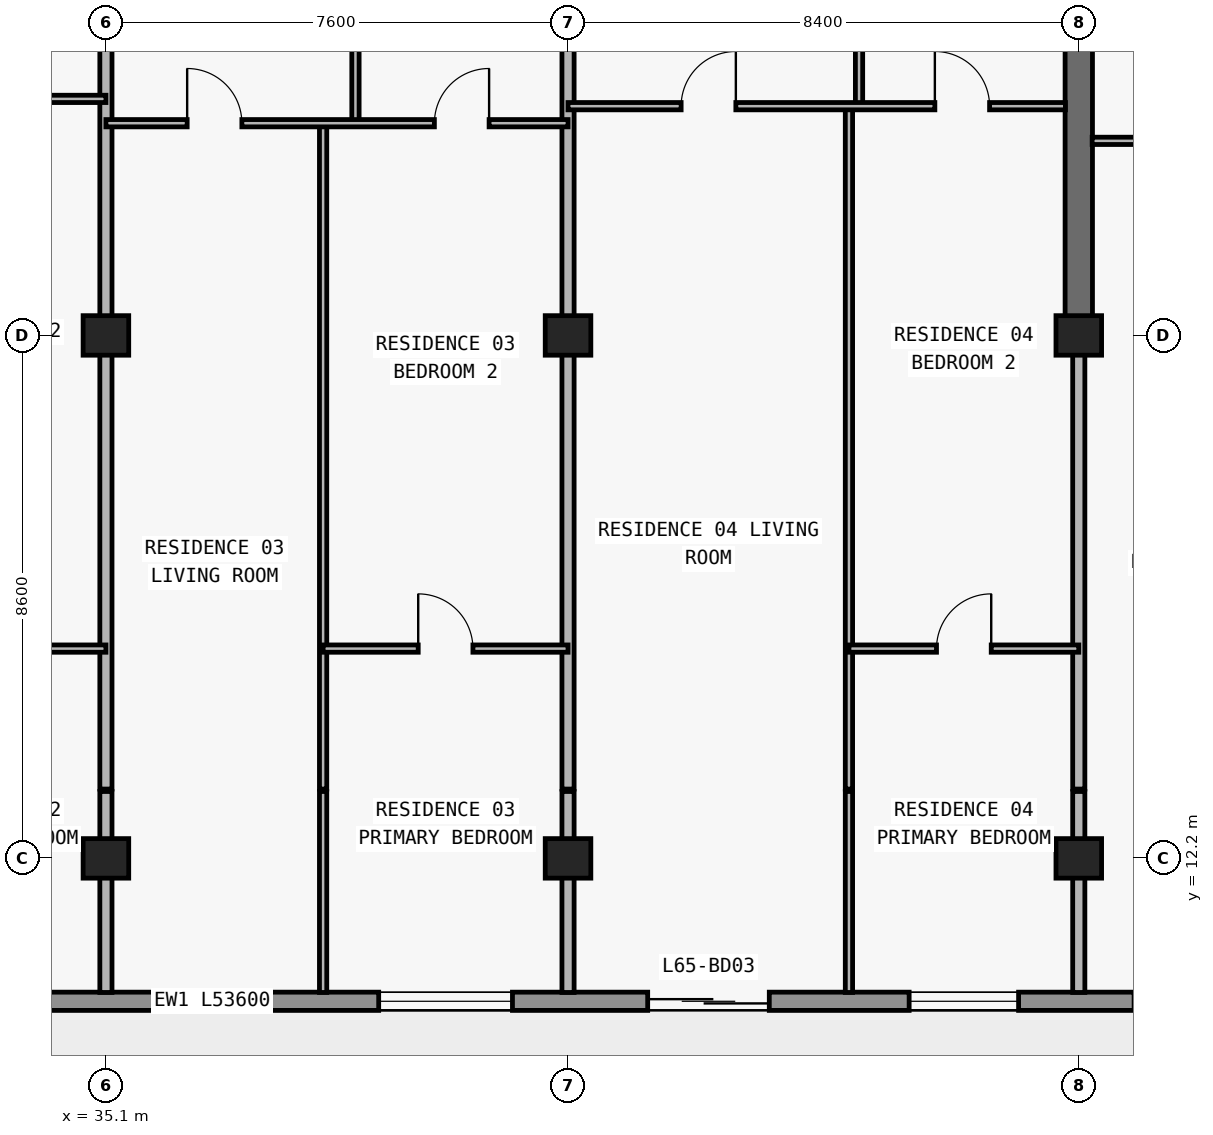
"""IFC4 building model, lengths in metres.
Left out: names, types, materials, properties, quantities, classifications, styles, units other than length and angle.
Written with IfcOpenShell. Run it as: python <this file> out.ifc"""

import sys

from ifc_helpers import new_model, si_unit, direction, frame, frame_2d, origin, origin_2d, place, context, subcontext, project, spatial, rectangle, extrude, element, fill, save


model = new_model("IFC4")
c1 = context("Model", 3, precision=1e-05, world=origin(), true_north=direction((0.0, 1.0)))
c2 = subcontext(c1, "Body", "Model", "MODEL_VIEW")
j1 = project(units=[si_unit("LENGTHUNIT", "METRE"), si_unit("PLANEANGLEUNIT", "RADIAN")], contexts=[c1])
p1 = place(None, origin())
s1 = spatial("IfcSite", under=j1, at=p1, CompositionType="ELEMENT")
p2 = place(p1, origin())
s2 = spatial("IfcBuilding", under=s1, at=p2, CompositionType="ELEMENT")
p3 = place(p2, frame((0.0, 0.0, 233.1)))
s3 = spatial("IfcBuildingStorey", under=s2, at=p3, CompositionType="ELEMENT", Elevation=233.1)
for number, where, z_axis, x_axis in (
    (1, (35.1, 12.2, 0.0), (0.0, 0.0, 1.0), (1.0, 0.0, 0.0)),
    (2, (42.7, 12.2, 0.0), (0.0, 0.0, 1.0), (1.0, 0.0, 0.0)),
    (3, (51.1, 12.2, 0.0), (0.0, 0.0, 1.0), (1.0, 0.0, 0.0)),
    (4, (35.1, 20.8, 0.0), (0.0, 0.0, 1.0), (1.0, 0.0, 0.0)),
    (5, (42.7, 20.8, 0.0), (0.0, 0.0, 1.0), (1.0, 0.0, 0.0)),
    (6, (51.1, 20.8, 0.0), (0.0, 0.0, 1.0), (1.0, 0.0, 0.0)),
):
    element("IfcColumn", number, at=place(p3, frame(where, z_axis=z_axis, x_axis=x_axis)), inside=s3, PredefinedType="COLUMN", context=c2, shape_type="SweptSolid", body=[
        extrude(rectangle(XDim=0.75, YDim=0.65, at=origin_2d()), origin(), (0.0, 0.0, 1.0), 3.05),
    ])
p4 = place(p3, frame((51.1, 20.8, 0.0), z_axis=(0.0, 0.0, 1.0), x_axis=(0.0, 1.0, 0.0)))
e7 = element("IfcWall", 7, at=p4, inside=s3, PredefinedType="SHEAR", context=c2, shape_type="SweptSolid", body=[
    extrude(rectangle(XDim=8.6, YDim=0.45, at=frame_2d((4.3, 0.0))), origin(), (0.0, 0.0, 1.0), 3.05),
])
p5 = place(p3, frame((65.7, 9.85, 0.0), z_axis=(0.0, 0.0, 1.0), x_axis=(-1.0, 0.0, 0.0)))
e8 = element("IfcWall", 8, at=p5, inside=s3, PredefinedType="STANDARD", context=c2, shape_type="SweptSolid", body=[
    extrude(rectangle(XDim=53.6, YDim=0.3, at=frame_2d((26.8, 0.0))), origin(), (0.0, 0.0, 1.0), 3.05),
])
p6 = place(p5, frame((49.5, 0.0, 0.0)))
e9 = element("IfcOpeningElement", 9, at=p6, cuts=e8, PredefinedType="OPENING", context=c2, shape_type="SweptSolid", body=[
    extrude(rectangle(XDim=2.0, YDim=2.3, at=frame_2d((1.0, 1.15))), frame((0.0, 0.16, 0.0), z_axis=(0.0, -1.0, 0.0), x_axis=(1.0, 0.0, 0.0)), (0.0, 0.0, 1.0), 0.32),
])
p7 = place(p5, frame((42.1, 0.0, 0.85)))
e10 = element("IfcOpeningElement", 10, at=p7, cuts=e8, PredefinedType="OPENING", context=c2, shape_type="SweptSolid", body=[
    extrude(rectangle(XDim=2.2, YDim=1.55, at=frame_2d((1.1, 0.775))), frame((0.0, 0.16, 0.0), z_axis=(0.0, -1.0, 0.0), x_axis=(1.0, 0.0, 0.0)), (0.0, 0.0, 1.0), 0.32),
])
p8 = place(p5, frame((35.69, 0.0, 0.0)))
e11 = element("IfcOpeningElement", 11, at=p8, cuts=e8, PredefinedType="OPENING", context=c2, shape_type="SweptSolid", body=[
    extrude(rectangle(XDim=2.0, YDim=2.3, at=frame_2d((1.0, 1.15))), frame((0.0, 0.16, 0.0), z_axis=(0.0, -1.0, 0.0), x_axis=(1.0, 0.0, 0.0)), (0.0, 0.0, 1.0), 0.32),
])
p9 = place(p5, frame((31.59, 0.0, 0.85)))
e12 = element("IfcOpeningElement", 12, at=p9, cuts=e8, PredefinedType="OPENING", context=c2, shape_type="SweptSolid", body=[
    extrude(rectangle(XDim=1.8, YDim=1.55, at=frame_2d((0.9, 0.775))), frame((0.0, 0.16, 0.0), z_axis=(0.0, -1.0, 0.0), x_axis=(1.0, 0.0, 0.0)), (0.0, 0.0, 1.0), 0.32),
])
p10 = place(p5, frame((23.914, 0.0, 0.85)))
e13 = element("IfcOpeningElement", 13, at=p10, cuts=e8, PredefinedType="OPENING", context=c2, shape_type="SweptSolid", body=[
    extrude(rectangle(XDim=2.2, YDim=1.55, at=frame_2d((1.1, 0.775))), frame((0.0, 0.16, 0.0), z_axis=(0.0, -1.0, 0.0), x_axis=(1.0, 0.0, 0.0)), (0.0, 0.0, 1.0), 0.32),
])
p11 = place(p5, frame((19.69, 0.0, 0.0)))
e14 = element("IfcOpeningElement", 14, at=p11, cuts=e8, PredefinedType="OPENING", context=c2, shape_type="SweptSolid", body=[
    extrude(rectangle(XDim=2.0, YDim=2.3, at=frame_2d((1.0, 1.15))), frame((0.0, 0.16, 0.0), z_axis=(0.0, -1.0, 0.0), x_axis=(1.0, 0.0, 0.0)), (0.0, 0.0, 1.0), 0.32),
])
p12 = place(p5, frame((15.59, 0.0, 0.85)))
e15 = element("IfcOpeningElement", 15, at=p12, cuts=e8, PredefinedType="OPENING", context=c2, shape_type="SweptSolid", body=[
    extrude(rectangle(XDim=1.8, YDim=1.55, at=frame_2d((0.9, 0.775))), frame((0.0, 0.16, 0.0), z_axis=(0.0, -1.0, 0.0), x_axis=(1.0, 0.0, 0.0)), (0.0, 0.0, 1.0), 0.32),
])
p13 = place(p5, frame((11.69, 0.0, 0.0)))
e16 = element("IfcOpeningElement", 16, at=p13, cuts=e8, PredefinedType="OPENING", context=c2, shape_type="SweptSolid", body=[
    extrude(rectangle(XDim=2.0, YDim=2.3, at=frame_2d((1.0, 1.15))), frame((0.0, 0.16, 0.0), z_axis=(0.0, -1.0, 0.0), x_axis=(1.0, 0.0, 0.0)), (0.0, 0.0, 1.0), 0.32),
])
p14 = place(p5, frame((7.01, 0.0, 0.65)))
e17 = element("IfcOpeningElement", 17, at=p14, cuts=e8, PredefinedType="OPENING", context=c2, shape_type="SweptSolid", body=[
    extrude(rectangle(XDim=2.6, YDim=1.85, at=frame_2d((1.3, 0.925))), frame((0.0, 0.16, 0.0), z_axis=(0.0, -1.0, 0.0), x_axis=(1.0, 0.0, 0.0)), (0.0, 0.0, 1.0), 0.32),
])
p15 = place(p5, frame((2.0, 0.0, 0.85)))
e18 = element("IfcOpeningElement", 18, at=p15, cuts=e8, PredefinedType="OPENING", context=c2, shape_type="SweptSolid", body=[
    extrude(rectangle(XDim=2.2, YDim=1.55, at=frame_2d((1.1, 0.775))), frame((0.0, 0.16, 0.0), z_axis=(0.0, -1.0, 0.0), x_axis=(1.0, 0.0, 0.0)), (0.0, 0.0, 1.0), 0.32),
])
p16 = place(p3, frame((35.1, 9.995, 0.0), z_axis=(0.0, 0.0, 1.0), x_axis=(0.0, 1.0, 0.0)))
e19 = element("IfcWall", 19, at=p16, inside=s3, PredefinedType="PARTITIONING", context=c2, shape_type="SweptSolid", body=[
    extrude(rectangle(XDim=3.305, YDim=0.2, at=frame_2d((1.652, 0.0))), origin(), (0.0, 0.0, 1.0), 2.263),
])
p17 = place(p3, frame((35.1, 13.34, 0.0), z_axis=(0.0, 0.0, 1.0), x_axis=(0.0, 1.0, 0.0)))
e20 = element("IfcWall", 20, at=p17, inside=s3, PredefinedType="PARTITIONING", context=c2, shape_type="SweptSolid", body=[
    extrude(rectangle(XDim=16.06, YDim=0.2, at=frame_2d((8.03, 0.0))), origin(), (0.0, 0.0, 1.0), 2.263),
])
p18 = place(p3, frame((38.672, 9.995, 0.0), z_axis=(0.0, 0.0, 1.0), x_axis=(0.0, 1.0, 0.0)))
e21 = element("IfcWall", 21, at=p18, inside=s3, PredefinedType="PARTITIONING", context=c2, shape_type="SweptSolid", body=[
    extrude(rectangle(XDim=3.305, YDim=0.12, at=frame_2d((1.652, 0.0))), origin(), (0.0, 0.0, 1.0), 2.578),
])
p19 = place(p3, frame((38.672, 13.34, 0.0), z_axis=(0.0, 0.0, 1.0), x_axis=(0.0, 1.0, 0.0)))
e22 = element("IfcWall", 22, at=p19, inside=s3, PredefinedType="PARTITIONING", context=c2, shape_type="SweptSolid", body=[
    extrude(rectangle(XDim=10.95, YDim=0.12, at=frame_2d((5.475, 0.0))), origin(), (0.0, 0.0, 1.0), 2.578),
])
p20 = place(p3, frame((39.204, 24.29, 0.0), z_axis=(0.0, 0.0, 1.0), x_axis=(0.0, 1.0, 0.0)))
e23 = element("IfcWall", 23, at=p20, inside=s3, PredefinedType="PARTITIONING", context=c2, shape_type="SweptSolid", body=[
    extrude(rectangle(XDim=5.11, YDim=0.12, at=frame_2d((2.555, 0.0))), origin(), (0.0, 0.0, 1.0), 3.05),
])
p21 = place(p20, frame((2.105, 0.0, 0.0)))
e24 = element("IfcOpeningElement", 24, at=p21, cuts=e23, PredefinedType="OPENING", context=c2, shape_type="SweptSolid", body=[
    extrude(rectangle(XDim=0.9, YDim=2.15, at=frame_2d((0.45, 1.075))), frame((0.0, 0.07, 0.0), z_axis=(0.0, -1.0, 0.0), x_axis=(1.0, 0.0, 0.0)), (0.0, 0.0, 1.0), 0.14),
])
p22 = place(p3, frame((42.7, 9.995, 0.0), z_axis=(0.0, 0.0, 1.0), x_axis=(0.0, 1.0, 0.0)))
e25 = element("IfcWall", 25, at=p22, inside=s3, PredefinedType="PARTITIONING", context=c2, shape_type="SweptSolid", body=[
    extrude(rectangle(XDim=3.305, YDim=0.2, at=frame_2d((1.652, 0.0))), origin(), (0.0, 0.0, 1.0), 2.263),
])
p23 = place(p3, frame((42.7, 13.34, 0.0), z_axis=(0.0, 0.0, 1.0), x_axis=(0.0, 1.0, 0.0)))
e26 = element("IfcWall", 26, at=p23, inside=s3, PredefinedType="PARTITIONING", context=c2, shape_type="SweptSolid", body=[
    extrude(rectangle(XDim=16.06, YDim=0.2, at=frame_2d((8.03, 0.0))), origin(), (0.0, 0.0, 1.0), 2.263),
])
p24 = place(p3, frame((47.32, 9.995, 0.0), z_axis=(0.0, 0.0, 1.0), x_axis=(0.0, 1.0, 0.0)))
e27 = element("IfcWall", 27, at=p24, inside=s3, PredefinedType="PARTITIONING", context=c2, shape_type="SweptSolid", body=[
    extrude(rectangle(XDim=3.305, YDim=0.12, at=frame_2d((1.652, 0.0))), origin(), (0.0, 0.0, 1.0), 3.05),
])
p25 = place(p3, frame((47.32, 13.34, 0.0), z_axis=(0.0, 0.0, 1.0), x_axis=(0.0, 1.0, 0.0)))
e28 = element("IfcWall", 28, at=p25, inside=s3, PredefinedType="PARTITIONING", context=c2, shape_type="SweptSolid", body=[
    extrude(rectangle(XDim=11.23, YDim=0.12, at=frame_2d((5.615, 0.0))), origin(), (0.0, 0.0, 1.0), 3.05),
])
p26 = place(p3, frame((47.486, 24.575, 0.0), z_axis=(0.0, 0.0, 1.0), x_axis=(0.0, 1.0, 0.0)))
e29 = element("IfcWall", 29, at=p26, inside=s3, PredefinedType="PARTITIONING", context=c2, shape_type="SweptSolid", body=[
    extrude(rectangle(XDim=4.825, YDim=0.12, at=frame_2d((2.413, 0.0))), origin(), (0.0, 0.0, 1.0), 3.05),
])
p27 = place(p26, frame((1.962, 0.0, 0.0)))
e30 = element("IfcOpeningElement", 30, at=p27, cuts=e29, PredefinedType="OPENING", context=c2, shape_type="SweptSolid", body=[
    extrude(rectangle(XDim=0.9, YDim=2.15, at=frame_2d((0.45, 1.075))), frame((0.0, 0.07, 0.0), z_axis=(0.0, -1.0, 0.0), x_axis=(1.0, 0.0, 0.0)), (0.0, 0.0, 1.0), 0.14),
])
p28 = place(p3, frame((51.1, 9.995, 0.0), z_axis=(0.0, 0.0, 1.0), x_axis=(0.0, 1.0, 0.0)))
e31 = element("IfcWall", 31, at=p28, inside=s3, PredefinedType="PARTITIONING", context=c2, shape_type="SweptSolid", body=[
    extrude(rectangle(XDim=3.305, YDim=0.2, at=frame_2d((1.652, 0.0))), origin(), (0.0, 0.0, 1.0), 2.263),
])
p29 = place(p3, frame((51.1, 13.34, 0.0), z_axis=(0.0, 0.0, 1.0), x_axis=(0.0, 1.0, 0.0)))
e32 = element("IfcWall", 32, at=p29, inside=s3, PredefinedType="PARTITIONING", context=c2, shape_type="SweptSolid", body=[
    extrude(rectangle(XDim=7.455, YDim=0.2, at=frame_2d((3.728, 0.0))), origin(), (0.0, 0.0, 1.0), 2.263),
])
p30 = place(p3, frame((31.4, 15.65, 0.0), z_axis=(0.0, 0.0, 1.0), x_axis=(1.0, 0.0, 0.0)))
e33 = element("IfcWall", 33, at=p30, inside=s3, PredefinedType="PARTITIONING", context=c2, shape_type="SweptSolid", body=[
    extrude(rectangle(XDim=3.7, YDim=0.12, at=frame_2d((1.85, 0.0))), origin(), (0.0, 0.0, 1.0), 3.05),
])
p31 = place(p30, frame((1.4, 0.0, 0.0)))
e34 = element("IfcOpeningElement", 34, at=p31, cuts=e33, PredefinedType="OPENING", context=c2, shape_type="SweptSolid", body=[
    extrude(rectangle(XDim=0.9, YDim=2.15, at=frame_2d((0.45, 1.075))), frame((0.0, 0.07, 0.0), z_axis=(0.0, -1.0, 0.0), x_axis=(1.0, 0.0, 0.0)), (0.0, 0.0, 1.0), 0.14),
])
p32 = place(p3, frame((38.672, 15.65, 0.0), z_axis=(0.0, 0.0, 1.0), x_axis=(1.0, 0.0, 0.0)))
e35 = element("IfcWall", 35, at=p32, inside=s3, PredefinedType="PARTITIONING", context=c2, shape_type="SweptSolid", body=[
    extrude(rectangle(XDim=4.028, YDim=0.12, at=frame_2d((2.014, 0.0))), origin(), (0.0, 0.0, 1.0), 3.05),
])
p33 = place(p32, frame((1.564, 0.0, 0.0)))
e36 = element("IfcOpeningElement", 36, at=p33, cuts=e35, PredefinedType="OPENING", context=c2, shape_type="SweptSolid", body=[
    extrude(rectangle(XDim=0.9, YDim=2.15, at=frame_2d((0.45, 1.075))), frame((0.0, 0.07, 0.0), z_axis=(0.0, -1.0, 0.0), x_axis=(1.0, 0.0, 0.0)), (0.0, 0.0, 1.0), 0.14),
])
p34 = place(p3, frame((47.32, 15.65, 0.0), z_axis=(0.0, 0.0, 1.0), x_axis=(1.0, 0.0, 0.0)))
e37 = element("IfcWall", 37, at=p34, inside=s3, PredefinedType="PARTITIONING", context=c2, shape_type="SweptSolid", body=[
    extrude(rectangle(XDim=3.78, YDim=0.12, at=frame_2d((1.89, 0.0))), origin(), (0.0, 0.0, 1.0), 3.05),
])
p35 = place(p34, frame((1.44, 0.0, 0.0)))
e38 = element("IfcOpeningElement", 38, at=p35, cuts=e37, PredefinedType="OPENING", context=c2, shape_type="SweptSolid", body=[
    extrude(rectangle(XDim=0.9, YDim=2.15, at=frame_2d((0.45, 1.075))), frame((0.0, 0.07, 0.0), z_axis=(0.0, -1.0, 0.0), x_axis=(1.0, 0.0, 0.0)), (0.0, 0.0, 1.0), 0.14),
])
p36 = place(p3, frame((51.32, 24.0, 0.0), z_axis=(0.0, 0.0, 1.0), x_axis=(1.0, 0.0, 0.0)))
e39 = element("IfcWall", 39, at=p36, inside=s3, PredefinedType="PARTITIONING", context=c2, shape_type="SweptSolid", body=[
    extrude(rectangle(XDim=8.18, YDim=0.12, at=frame_2d((4.09, 0.0))), origin(), (0.0, 0.0, 1.0), 3.05),
])
p37 = place(p36, frame((1.33, 0.0, 0.0)))
e40 = element("IfcOpeningElement", 40, at=p37, cuts=e39, PredefinedType="OPENING", context=c2, shape_type="SweptSolid", body=[
    extrude(rectangle(XDim=0.9, YDim=2.15, at=frame_2d((0.45, 1.075))), frame((0.0, 0.07, 0.0), z_axis=(0.0, -1.0, 0.0), x_axis=(1.0, 0.0, 0.0)), (0.0, 0.0, 1.0), 0.14),
])
p38 = place(p3, frame((35.1, 24.29, 0.0), z_axis=(0.0, 0.0, 1.0), x_axis=(1.0, 0.0, 0.0)))
e41 = element("IfcWall", 41, at=p38, inside=s3, PredefinedType="PARTITIONING", context=c2, shape_type="SweptSolid", body=[
    extrude(rectangle(XDim=7.6, YDim=0.12, at=frame_2d((3.8, 0.0))), origin(), (0.0, 0.0, 1.0), 3.05),
])
p39 = place(p38, frame((1.336, 0.0, 0.0)))
e42 = element("IfcOpeningElement", 42, at=p39, cuts=e41, PredefinedType="OPENING", context=c2, shape_type="SweptSolid", body=[
    extrude(rectangle(XDim=0.9, YDim=2.15, at=frame_2d((0.45, 1.075))), frame((0.0, 0.07, 0.0), z_axis=(0.0, -1.0, 0.0), x_axis=(1.0, 0.0, 0.0)), (0.0, 0.0, 1.0), 0.14),
])
p40 = place(p38, frame((5.402, 0.0, 0.0)))
e43 = element("IfcOpeningElement", 43, at=p40, cuts=e41, PredefinedType="OPENING", context=c2, shape_type="SweptSolid", body=[
    extrude(rectangle(XDim=0.9, YDim=2.15, at=frame_2d((0.45, 1.075))), frame((0.0, 0.07, 0.0), z_axis=(0.0, -1.0, 0.0), x_axis=(1.0, 0.0, 0.0)), (0.0, 0.0, 1.0), 0.14),
])
p41 = place(p3, frame((42.7, 24.57, 0.0), z_axis=(0.0, 0.0, 1.0), x_axis=(1.0, 0.0, 0.0)))
e44 = element("IfcWall", 44, at=p41, inside=s3, PredefinedType="PARTITIONING", context=c2, shape_type="SweptSolid", body=[
    extrude(rectangle(XDim=8.18, YDim=0.12, at=frame_2d((4.09, 0.0))), origin(), (0.0, 0.0, 1.0), 3.05),
])
p42 = place(p41, frame((1.86, 0.0, 0.0)))
e45 = element("IfcOpeningElement", 45, at=p42, cuts=e44, PredefinedType="OPENING", context=c2, shape_type="SweptSolid", body=[
    extrude(rectangle(XDim=0.9, YDim=2.15, at=frame_2d((0.45, 1.075))), frame((0.0, 0.07, 0.0), z_axis=(0.0, -1.0, 0.0), x_axis=(1.0, 0.0, 0.0)), (0.0, 0.0, 1.0), 0.14),
])
p43 = place(p41, frame((6.033, 0.0, 0.0)))
e46 = element("IfcOpeningElement", 46, at=p43, cuts=e44, PredefinedType="OPENING", context=c2, shape_type="SweptSolid", body=[
    extrude(rectangle(XDim=0.9, YDim=2.15, at=frame_2d((0.45, 1.075))), frame((0.0, 0.07, 0.0), z_axis=(0.0, -1.0, 0.0), x_axis=(1.0, 0.0, 0.0)), (0.0, 0.0, 1.0), 0.14),
])
p44 = place(p3, frame((31.4, 24.69, 0.0), z_axis=(0.0, 0.0, 1.0), x_axis=(1.0, 0.0, 0.0)))
e47 = element("IfcWall", 47, at=p44, inside=s3, PredefinedType="PARTITIONING", context=c2, shape_type="SweptSolid", body=[
    extrude(rectangle(XDim=3.7, YDim=0.12, at=frame_2d((1.85, 0.0))), origin(), (0.0, 0.0, 1.0), 3.05),
])
p45 = place(p44, frame((1.4, 0.0, 0.0)))
e48 = element("IfcOpeningElement", 48, at=p45, cuts=e47, PredefinedType="OPENING", context=c2, shape_type="SweptSolid", body=[
    extrude(rectangle(XDim=0.9, YDim=2.15, at=frame_2d((0.45, 1.075))), frame((0.0, 0.07, 0.0), z_axis=(0.0, -1.0, 0.0), x_axis=(1.0, 0.0, 0.0)), (0.0, 0.0, 1.0), 0.14),
])
p46 = place(p10, origin())
e49 = element("IfcWindow", 49, at=p46, inside=s3, PartitioningType="SINGLE_PANEL", PredefinedType="WINDOW", context=c2, shape_type="SweptSolid", body=[
    extrude(rectangle(XDim=2.2, YDim=1.55, at=frame_2d((1.1, 0.775))), frame((0.0, 0.03, 0.0), z_axis=(0.0, -1.0, 0.0), x_axis=(1.0, 0.0, 0.0)), (0.0, 0.0, 1.0), 0.06),
])
fill(e13, e49)
p47 = place(p11, origin())
e50 = element("IfcDoor", 50, at=p47, inside=s3, OperationType="DOUBLE_DOOR_SLIDING", PredefinedType="DOOR", context=c2, shape_type="SweptSolid", body=[
    extrude(rectangle(XDim=2.0, YDim=2.3, at=frame_2d((1.0, 1.15))), frame((0.0, 0.025, 0.0), z_axis=(0.0, -1.0, 0.0), x_axis=(1.0, 0.0, 0.0)), (0.0, 0.0, 1.0), 0.05),
])
fill(e14, e50)
p48 = place(p12, origin())
e51 = element("IfcWindow", 51, at=p48, inside=s3, PartitioningType="SINGLE_PANEL", PredefinedType="WINDOW", context=c2, shape_type="SweptSolid", body=[
    extrude(rectangle(XDim=1.8, YDim=1.55, at=frame_2d((0.9, 0.775))), frame((0.0, 0.03, 0.0), z_axis=(0.0, -1.0, 0.0), x_axis=(1.0, 0.0, 0.0)), (0.0, 0.0, 1.0), 0.06),
])
fill(e15, e51)
p49 = place(p39, origin())
e52 = element("IfcDoor", 52, at=p49, inside=s3, OperationType="SINGLE_SWING_LEFT", PredefinedType="DOOR", context=c2, shape_type="SweptSolid", body=[
    extrude(rectangle(XDim=0.9, YDim=2.15, at=frame_2d((0.45, 1.075))), frame((0.0, 0.025, 0.0), z_axis=(0.0, -1.0, 0.0), x_axis=(1.0, 0.0, 0.0)), (0.0, 0.0, 1.0), 0.05),
])
fill(e42, e52)
p50 = place(p40, origin())
e53 = element("IfcDoor", 53, at=p50, inside=s3, OperationType="SINGLE_SWING_RIGHT", PredefinedType="DOOR", context=c2, shape_type="SweptSolid", body=[
    extrude(rectangle(XDim=0.9, YDim=2.15, at=frame_2d((0.45, 1.075))), frame((0.0, 0.025, 0.0), z_axis=(0.0, -1.0, 0.0), x_axis=(1.0, 0.0, 0.0)), (0.0, 0.0, 1.0), 0.05),
])
fill(e43, e53)
p51 = place(p33, origin())
e54 = element("IfcDoor", 54, at=p51, inside=s3, OperationType="SINGLE_SWING_LEFT", PredefinedType="DOOR", context=c2, shape_type="SweptSolid", body=[
    extrude(rectangle(XDim=0.9, YDim=2.15, at=frame_2d((0.45, 1.075))), frame((0.0, 0.025, 0.0), z_axis=(0.0, -1.0, 0.0), x_axis=(1.0, 0.0, 0.0)), (0.0, 0.0, 1.0), 0.05),
])
fill(e36, e54)
p52 = place(p42, origin())
e55 = element("IfcDoor", 55, at=p52, inside=s3, OperationType="SINGLE_SWING_RIGHT", PredefinedType="DOOR", context=c2, shape_type="SweptSolid", body=[
    extrude(rectangle(XDim=0.9, YDim=2.15, at=frame_2d((0.45, 1.075))), frame((0.0, 0.025, 0.0), z_axis=(0.0, -1.0, 0.0), x_axis=(1.0, 0.0, 0.0)), (0.0, 0.0, 1.0), 0.05),
])
fill(e45, e55)
p53 = place(p43, origin())
e56 = element("IfcDoor", 56, at=p53, inside=s3, OperationType="SINGLE_SWING_LEFT", PredefinedType="DOOR", context=c2, shape_type="SweptSolid", body=[
    extrude(rectangle(XDim=0.9, YDim=2.15, at=frame_2d((0.45, 1.075))), frame((0.0, 0.025, 0.0), z_axis=(0.0, -1.0, 0.0), x_axis=(1.0, 0.0, 0.0)), (0.0, 0.0, 1.0), 0.05),
])
fill(e46, e56)
p54 = place(p35, origin())
e57 = element("IfcDoor", 57, at=p54, inside=s3, OperationType="SINGLE_SWING_RIGHT", PredefinedType="DOOR", context=c2, shape_type="SweptSolid", body=[
    extrude(rectangle(XDim=0.9, YDim=2.15, at=frame_2d((0.45, 1.075))), frame((0.0, 0.025, 0.0), z_axis=(0.0, -1.0, 0.0), x_axis=(1.0, 0.0, 0.0)), (0.0, 0.0, 1.0), 0.05),
])
fill(e38, e57)
save(model, sys.argv[1])
